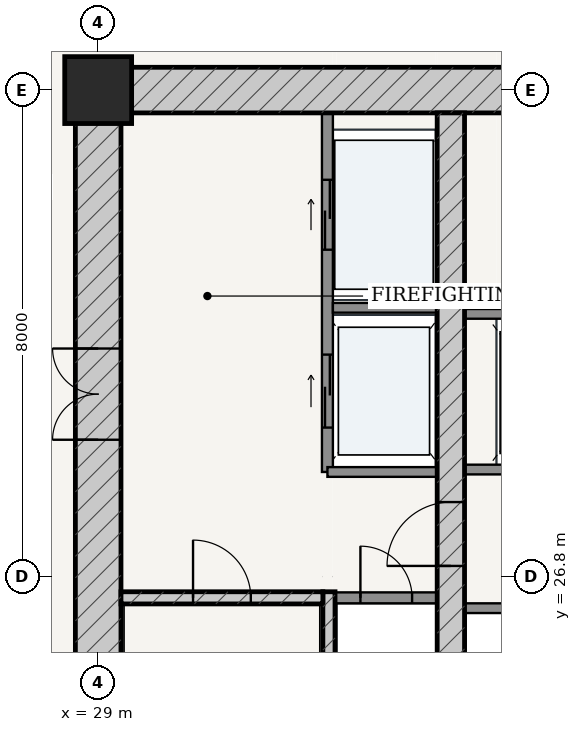
"""IFC4 building model, lengths in metres.
Left out: names, types, materials, properties, quantities, classifications, styles, units other than length and angle.
Written with IfcOpenShell. Run it as: python <this file> out.ifc"""

import sys

from ifc_helpers import new_model, si_unit, direction, frame, frame_2d, origin, origin_2d, place, context, subcontext, project, spatial, rectangle, extrude, source, transform, mapped, element, fill, save


model = new_model("IFC4")
c1 = context("Model", 3, precision=1e-05, world=origin(), true_north=direction((-0.2419218956, 0.970295726276)))
c2 = subcontext(c1, "Body", "Model", "MODEL_VIEW")
j1 = project(units=[si_unit("LENGTHUNIT", "METRE"), si_unit("PLANEANGLEUNIT", "RADIAN")], contexts=[c1])
p1 = place(None, origin())
s1 = spatial("IfcSite", under=j1, at=p1, CompositionType="ELEMENT")
p2 = place(p1, origin())
s2 = spatial("IfcBuilding", under=s1, at=p2, CompositionType="ELEMENT")
p3 = place(p2, frame((0.0, 0.0, 60.0)))
s3 = spatial("IfcBuildingStorey", under=s2, at=p3, CompositionType="ELEMENT", Elevation=60.0)
p4 = place(p3, frame((29.0, 34.8, 0.0), z_axis=(0.0, 0.0, 1.0), x_axis=(1.0, 0.0, 0.0)))
e1 = element("IfcColumn", 1, at=p4, inside=s3, PredefinedType="COLUMN", context=c2, shape_type="SweptSolid", body=[
    extrude(rectangle(XDim=1.1, YDim=1.1, at=origin_2d()), origin(), (0.0, 0.0, 1.0), 3.6),
])
p5 = place(p3, frame((28.625, 34.8, 0.0), z_axis=(0.0, 0.0, 1.0), x_axis=(1.0, 0.0, 0.0)))
e2 = element("IfcWall", 2, at=p5, inside=s3, PredefinedType="SHEAR", context=c2, shape_type="SweptSolid", body=[
    extrude(rectangle(XDim=18.75, YDim=0.75, at=frame_2d((9.375, 0.0))), origin(), (0.0, 0.0, 1.0), 3.32),
])
p6 = place(p5, frame((8.95, 0.0, 0.0)))
e3 = element("IfcOpeningElement", 3, at=p6, cuts=e2, PredefinedType="OPENING", context=c2, shape_type="SweptSolid", body=[
    extrude(rectangle(XDim=0.85, YDim=2.1, at=frame_2d((0.425, 1.05))), frame((0.0, 0.385, 0.0), z_axis=(0.0, -1.0, 0.0), x_axis=(1.0, 0.0, 0.0)), (0.0, 0.0, 1.0), 0.77),
])
p7 = place(p3, frame((29.0, 19.175, 0.0), z_axis=(0.0, 0.0, 1.0), x_axis=(0.0, 1.0, 0.0)))
e4 = element("IfcWall", 4, at=p7, inside=s3, PredefinedType="SHEAR", context=c2, shape_type="SweptSolid", body=[
    extrude(rectangle(XDim=15.25, YDim=0.75, at=frame_2d((7.625, 0.0))), origin(), (0.0, 0.0, 1.0), 3.32),
])
p8 = place(p7, frame((9.875, 0.0, 0.0)))
e5 = element("IfcOpeningElement", 5, at=p8, cuts=e4, PredefinedType="OPENING", context=c2, shape_type="SweptSolid", body=[
    extrude(rectangle(XDim=1.5, YDim=2.2, at=frame_2d((0.75, 1.1))), frame((0.0, 0.385, 0.0), z_axis=(0.0, -1.0, 0.0), x_axis=(1.0, 0.0, 0.0)), (0.0, 0.0, 1.0), 0.77),
])
p9 = place(p3, frame((32.795, 19.175, 0.0), z_axis=(0.0, 0.0, 1.0), x_axis=(0.0, 1.0, 0.0)))
e6 = element("IfcWall", 6, at=p9, inside=s3, PredefinedType="SOLIDWALL", context=c2, shape_type="SweptSolid", body=[
    extrude(rectangle(XDim=7.375, YDim=0.2, at=frame_2d((3.688, 0.0))), origin(), (0.0, 0.0, 1.0), 3.32),
])
p10 = place(p3, frame((29.375, 26.45, 0.0), z_axis=(0.0, 0.0, 1.0), x_axis=(1.0, 0.0, 0.0)))
e7 = element("IfcWall", 7, at=p10, inside=s3, PredefinedType="SOLIDWALL", context=c2, shape_type="SweptSolid", body=[
    extrude(rectangle(XDim=3.32, YDim=0.2, at=frame_2d((1.66, 0.0))), origin(), (0.0, 0.0, 1.0), 3.32),
])
p11 = place(p10, frame((1.185, 0.0, 0.0)))
e8 = element("IfcOpeningElement", 8, at=p11, cuts=e7, PredefinedType="OPENING", context=c2, shape_type="SweptSolid", body=[
    extrude(rectangle(XDim=0.95, YDim=2.15, at=frame_2d((0.475, 1.075))), frame((0.0, 0.11, 0.0), z_axis=(0.0, -1.0, 0.0), x_axis=(1.0, 0.0, 0.0)), (0.0, 0.0, 1.0), 0.22),
])
p12 = place(p3, frame((34.8, 19.175, 0.0), z_axis=(0.0, 0.0, 1.0), x_axis=(0.0, 1.0, 0.0)))
e9 = element("IfcWall", 9, at=p12, inside=s3, PredefinedType="SHEAR", context=c2, shape_type="SweptSolid", body=[
    extrude(rectangle(XDim=15.25, YDim=0.45, at=frame_2d((7.625, 0.0))), origin(), (0.0, 0.0, 1.0), 3.32),
])
p13 = place(p12, frame((7.8, 0.0, 0.0)))
e10 = element("IfcOpeningElement", 10, at=p13, cuts=e9, PredefinedType="OPENING", context=c2, shape_type="SweptSolid", body=[
    extrude(rectangle(XDim=1.05, YDim=2.15, at=frame_2d((0.525, 1.075))), frame((0.0, 0.235, 0.0), z_axis=(0.0, -1.0, 0.0), x_axis=(1.0, 0.0, 0.0)), (0.0, 0.0, 1.0), 0.47),
])
p14 = place(p3, frame((32.9, 26.45, 0.0), z_axis=(0.0, 0.0, 1.0), x_axis=(1.0, 0.0, 0.0)))
e11 = element("IfcWall", 11, at=p14, inside=s3, PredefinedType="PARTITIONING", context=c2, shape_type="SweptSolid", body=[
    extrude(rectangle(XDim=1.675, YDim=0.18, at=frame_2d((0.837, 0.0))), origin(), (0.0, 0.0, 1.0), 3.32),
])
p15 = place(p14, frame((0.413, 0.0, 0.0)))
e12 = element("IfcOpeningElement", 12, at=p15, cuts=e11, PredefinedType="OPENING", context=c2, shape_type="SweptSolid", body=[
    extrude(rectangle(XDim=0.85, YDim=2.1, at=frame_2d((0.425, 1.05))), frame((0.0, 0.1, 0.0), z_axis=(0.0, -1.0, 0.0), x_axis=(1.0, 0.0, 0.0)), (0.0, 0.0, 1.0), 0.2),
])
p16 = place(p3, frame((32.77, 28.52, 0.0), z_axis=(0.0, 0.0, 1.0), x_axis=(0.0, 1.0, 0.0)))
e13 = element("IfcWall", 13, at=p16, inside=s3, PredefinedType="PARTITIONING", context=c2, shape_type="SweptSolid", body=[
    extrude(rectangle(XDim=5.905, YDim=0.18, at=frame_2d((2.953, 0.0))), origin(), (0.0, 0.0, 1.0), 3.32),
])
p17 = place(p16, frame((3.655, 0.0, 0.0)))
e14 = element("IfcOpeningElement", 14, at=p17, cuts=e13, PredefinedType="OPENING", context=c2, shape_type="SweptSolid", body=[
    extrude(rectangle(XDim=1.15, YDim=2.2, at=frame_2d((0.575, 1.1))), frame((0.0, 0.1, 0.0), z_axis=(0.0, -1.0, 0.0), x_axis=(1.0, 0.0, 0.0)), (0.0, 0.0, 1.0), 0.2),
])
p18 = place(p16, frame((0.73, 0.0, 0.0)))
e15 = element("IfcOpeningElement", 15, at=p18, cuts=e13, PredefinedType="OPENING", context=c2, shape_type="SweptSolid", body=[
    extrude(rectangle(XDim=1.2, YDim=2.25, at=frame_2d((0.6, 1.125))), frame((0.0, 0.1, 0.0), z_axis=(0.0, -1.0, 0.0), x_axis=(1.0, 0.0, 0.0)), (0.0, 0.0, 1.0), 0.2),
])
p19 = place(p3, frame((32.86, 31.22, 0.0), z_axis=(0.0, 0.0, 1.0), x_axis=(1.0, 0.0, 0.0)))
e16 = element("IfcWall", 16, at=p19, inside=s3, PredefinedType="PARTITIONING", context=c2, shape_type="SweptSolid", body=[
    extrude(rectangle(XDim=1.715, YDim=0.16, at=frame_2d((0.857, 0.0))), origin(), (0.0, 0.0, 1.0), 3.32),
])
p20 = place(p3, frame((32.77, 28.52, 0.0), z_axis=(0.0, 0.0, 1.0), x_axis=(1.0, 0.0, 0.0)))
e17 = element("IfcWall", 17, at=p20, inside=s3, PredefinedType="PARTITIONING", context=c2, shape_type="SweptSolid", body=[
    extrude(rectangle(XDim=1.805, YDim=0.16, at=frame_2d((0.902, 0.0))), origin(), (0.0, 0.0, 1.0), 3.32),
])
p21 = place(p3, frame((35.025, 28.56, 0.0), z_axis=(0.0, 0.0, 1.0), x_axis=(1.0, 0.0, 0.0)))
e18 = element("IfcWall", 18, at=p21, inside=s3, PredefinedType="PARTITIONING", context=c2, shape_type="SweptSolid", body=[
    extrude(rectangle(XDim=5.95, YDim=0.16, at=frame_2d((2.975, 0.0))), origin(), (0.0, 0.0, 1.0), 3.32),
])
p22 = place(p21, frame((0.76, 0.0, 0.0)))
e19 = element("IfcOpeningElement", 19, at=p22, cuts=e18, PredefinedType="OPENING", context=c2, shape_type="SweptSolid", body=[
    extrude(rectangle(XDim=1.1, YDim=2.2, at=frame_2d((0.55, 1.1))), frame((0.0, 0.09, 0.0), z_axis=(0.0, -1.0, 0.0), x_axis=(1.0, 0.0, 0.0)), (0.0, 0.0, 1.0), 0.18),
])
p23 = place(p21, frame((2.425, 0.0, 0.0)))
e20 = element("IfcOpeningElement", 20, at=p23, cuts=e18, PredefinedType="OPENING", context=c2, shape_type="SweptSolid", body=[
    extrude(rectangle(XDim=1.1, YDim=2.2, at=frame_2d((0.55, 1.1))), frame((0.0, 0.09, 0.0), z_axis=(0.0, -1.0, 0.0), x_axis=(1.0, 0.0, 0.0)), (0.0, 0.0, 1.0), 0.18),
])
p24 = place(p21, frame((4.09, 0.0, 0.0)))
e21 = element("IfcOpeningElement", 21, at=p24, cuts=e18, PredefinedType="OPENING", context=c2, shape_type="SweptSolid", body=[
    extrude(rectangle(XDim=1.1, YDim=2.2, at=frame_2d((0.55, 1.1))), frame((0.0, 0.09, 0.0), z_axis=(0.0, -1.0, 0.0), x_axis=(1.0, 0.0, 0.0)), (0.0, 0.0, 1.0), 0.18),
])
for number, where, z_axis, x_axis in (
    (22, (35.025, 31.12, 0.0), (0.0, 0.0, 1.0), (1.0, 0.0, 0.0)),
    (23, (35.025, 26.28, 0.0), (0.0, 0.0, 1.0), (1.0, 0.0, 0.0)),
):
    element("IfcWall", number, at=place(p3, frame(where, z_axis=z_axis, x_axis=x_axis)), inside=s3, PredefinedType="PARTITIONING", context=c2, shape_type="SweptSolid", body=[
        extrude(rectangle(XDim=5.95, YDim=0.16, at=frame_2d((2.975, 0.0))), origin(), (0.0, 0.0, 1.0), 3.32),
    ])
m1 = source(origin(), c2, "Body", "SweptSolid", [
    extrude(rectangle(XDim=1.5, YDim=2.2, at=frame_2d((0.75, 1.1))), frame((0.0, 0.025, 0.0), z_axis=(0.0, -1.0, 0.0), x_axis=(1.0, 0.0, 0.0)), (0.0, 0.0, 1.0), 0.05),
])
p25 = place(p8, origin())
e24 = element("IfcDoor", 24, at=p25, inside=s3, OperationType="DOUBLE_DOOR_SINGLE_SWING", PredefinedType="DOOR", context=c2, shape_type="MappedRepresentation", body=[
    mapped(m1, transform((0.0, 0.0, 0.0), scale=1.0)),
])
fill(e5, e24)
m2 = source(origin(), c2, "Body", "SweptSolid", [
    extrude(rectangle(XDim=1.05, YDim=2.15, at=frame_2d((0.525, 1.075))), frame((0.0, 0.025, 0.0), z_axis=(0.0, -1.0, 0.0), x_axis=(1.0, 0.0, 0.0)), (0.0, 0.0, 1.0), 0.05),
])
p26 = place(p13, origin())
e25 = element("IfcDoor", 25, at=p26, inside=s3, OperationType="SINGLE_SWING_LEFT", PredefinedType="DOOR", context=c2, shape_type="MappedRepresentation", body=[
    mapped(m2, transform((0.0, 0.0, 0.0), scale=1.0)),
])
fill(e10, e25)
m3 = source(origin(), c2, "Body", "SweptSolid", [
    extrude(rectangle(XDim=0.95, YDim=2.15, at=frame_2d((0.475, 1.075))), frame((0.0, 0.025, 0.0), z_axis=(0.0, -1.0, 0.0), x_axis=(1.0, 0.0, 0.0)), (0.0, 0.0, 1.0), 0.05),
])
p27 = place(p11, origin())
e26 = element("IfcDoor", 26, at=p27, inside=s3, OperationType="SINGLE_SWING_LEFT", PredefinedType="DOOR", context=c2, shape_type="MappedRepresentation", body=[
    mapped(m3, transform((0.0, 0.0, 0.0), scale=1.0)),
])
fill(e8, e26)
m4 = source(origin(), c2, "Body", "SweptSolid", [
    extrude(rectangle(XDim=0.85, YDim=2.1, at=frame_2d((0.425, 1.05))), frame((0.0, 0.025, 0.0), z_axis=(0.0, -1.0, 0.0), x_axis=(1.0, 0.0, 0.0)), (0.0, 0.0, 1.0), 0.05),
])
p28 = place(p15, origin())
e27 = element("IfcDoor", 27, at=p28, inside=s3, OperationType="SINGLE_SWING_LEFT", PredefinedType="DOOR", context=c2, shape_type="MappedRepresentation", body=[
    mapped(m4, transform((0.0, 0.0, 0.0), scale=1.0)),
])
fill(e12, e27)
m5 = source(origin(), c2, "Body", "SweptSolid", [
    extrude(rectangle(XDim=1.15, YDim=2.2, at=frame_2d((0.575, 1.1))), frame((0.0, 0.025, 0.0), z_axis=(0.0, -1.0, 0.0), x_axis=(1.0, 0.0, 0.0)), (0.0, 0.0, 1.0), 0.05),
])
p29 = place(p17, origin())
e28 = element("IfcDoor", 28, at=p29, inside=s3, OperationType="DOUBLE_DOOR_SLIDING", PredefinedType="DOOR", context=c2, shape_type="MappedRepresentation", body=[
    mapped(m5, transform((0.0, 0.0, 0.0), scale=1.0)),
])
fill(e14, e28)
m6 = source(origin(), c2, "Body", "SweptSolid", [
    extrude(rectangle(XDim=1.2, YDim=2.25, at=frame_2d((0.6, 1.125))), frame((0.0, 0.025, 0.0), z_axis=(0.0, -1.0, 0.0), x_axis=(1.0, 0.0, 0.0)), (0.0, 0.0, 1.0), 0.05),
])
p30 = place(p18, origin())
e29 = element("IfcDoor", 29, at=p30, inside=s3, OperationType="DOUBLE_DOOR_SLIDING", PredefinedType="DOOR", context=c2, shape_type="MappedRepresentation", body=[
    mapped(m6, transform((0.0, 0.0, 0.0), scale=1.0)),
])
fill(e15, e29)
save(model, sys.argv[1])
